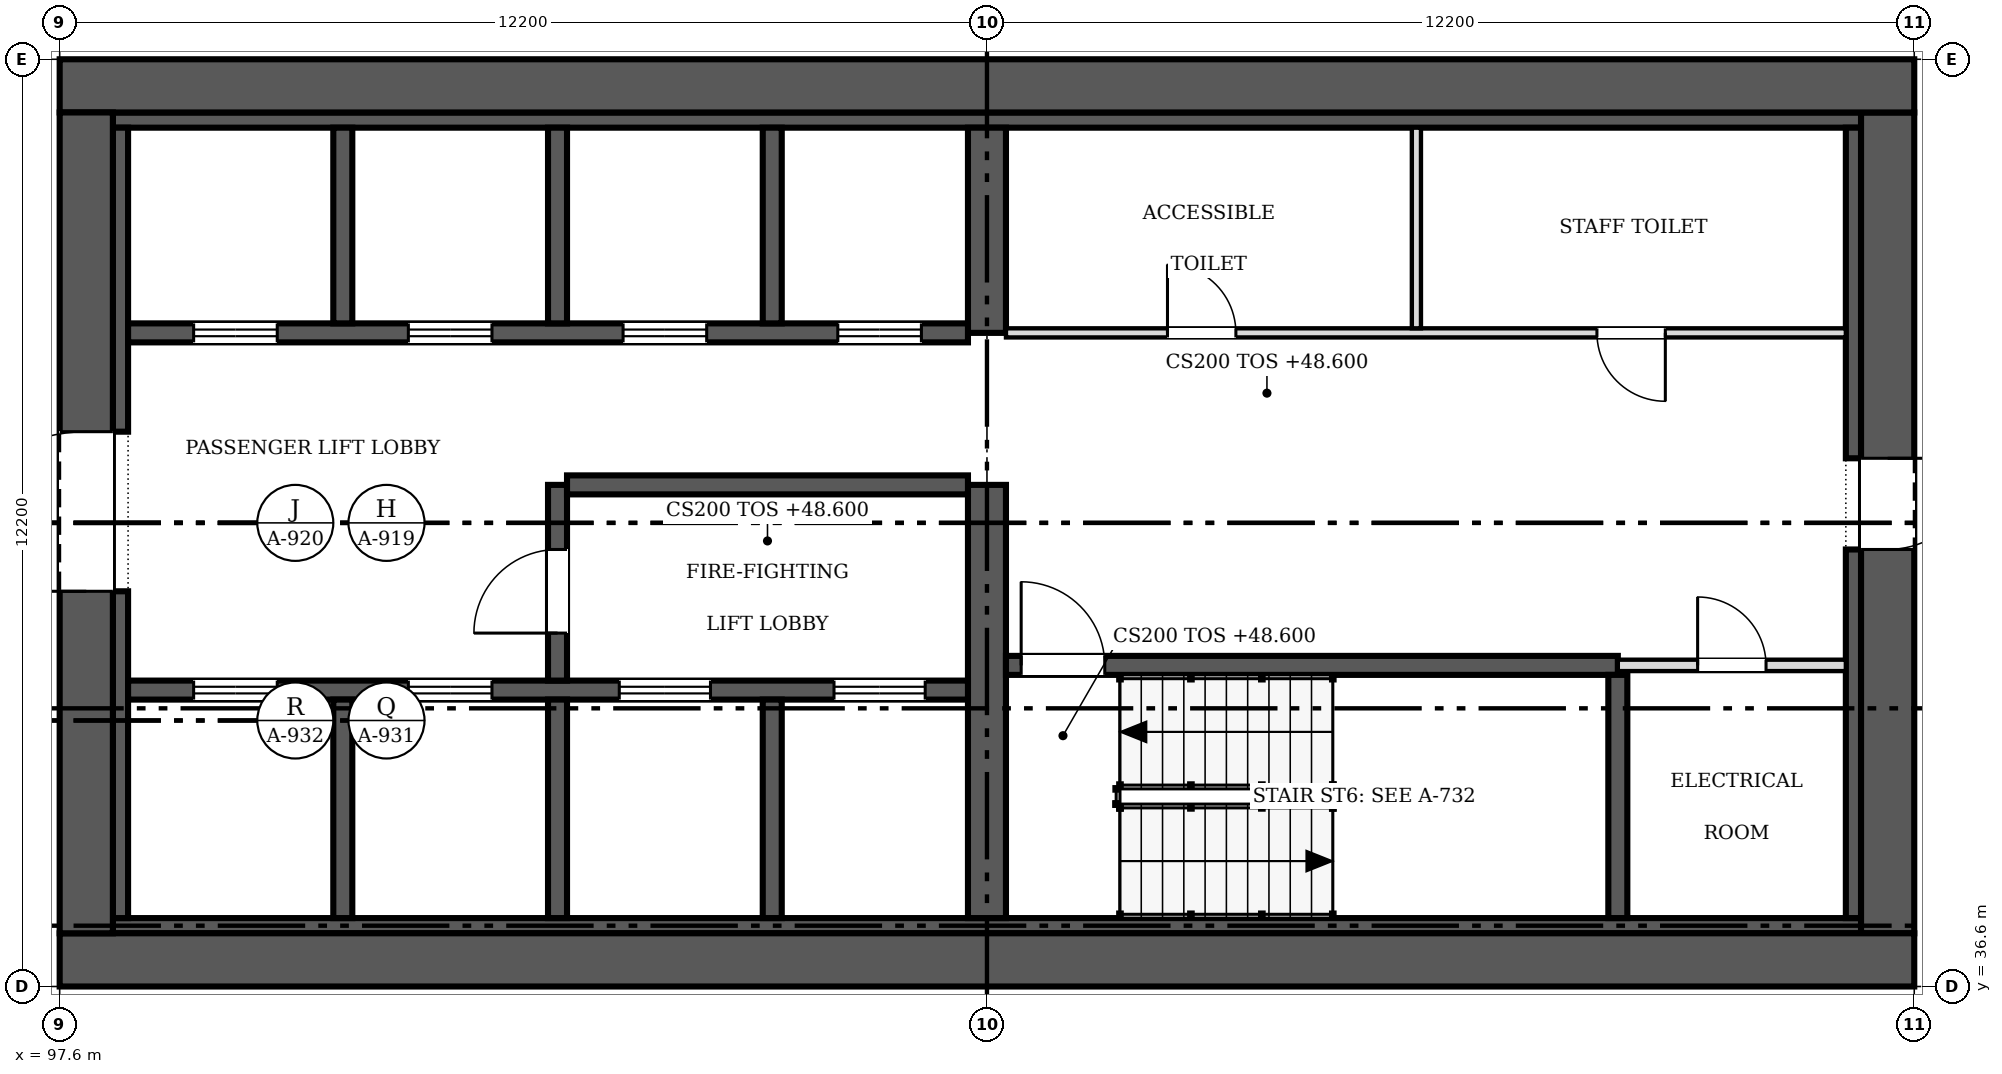
"""IFC4 building model, lengths in metres.
Left out: names, types, materials, properties, quantities, classifications, styles, units other than length and angle.
Written with IfcOpenShell. Run it as: python <this file> out.ifc"""

import sys

from ifc_helpers import new_model, si_unit, direction, frame, frame_2d, origin, place, context, subcontext, project, spatial, rectangle, extrude, source, transform, mapped, element, fill, save


model = new_model("IFC4")
c1 = context("Model", 3, precision=1e-05, world=origin(), true_north=direction((0.0, 1.0)))
c2 = subcontext(c1, "Body", "Model", "MODEL_VIEW")
j1 = project(units=[si_unit("LENGTHUNIT", "METRE"), si_unit("PLANEANGLEUNIT", "RADIAN")], contexts=[c1])
p1 = place(None, origin())
s1 = spatial("IfcSite", under=j1, at=p1, CompositionType="ELEMENT")
p2 = place(p1, origin())
s2 = spatial("IfcBuilding", under=s1, at=p2, CompositionType="ELEMENT")
p3 = place(p2, frame((0.0, 0.0, 48.6)))
s3 = spatial("IfcBuildingStorey", under=s2, at=p3, CompositionType="ELEMENT", Elevation=48.6)
p4 = place(p3, frame((122.0, 36.95, 0.0), z_axis=(0.0, 0.0, 1.0), x_axis=(-1.0, 0.0, 0.0)))
e1 = element("IfcWall", 1, at=p4, inside=s3, PredefinedType="SHEAR", context=c2, shape_type="SweptSolid", body=[
    extrude(rectangle(XDim=24.4, YDim=0.7, at=frame_2d((12.2, 0.0))), origin(), (0.0, 0.0, 1.0), 3.8),
])
p5 = place(p3, frame((97.95, 37.3, 0.0), z_axis=(0.0, 0.0, 1.0), x_axis=(0.0, 1.0, 0.0)))
e2 = element("IfcWall", 2, at=p5, inside=s3, PredefinedType="SHEAR", context=c2, shape_type="SweptSolid", body=[
    extrude(rectangle(XDim=10.8, YDim=0.7, at=frame_2d((5.4, 0.0))), origin(), (0.0, 0.0, 1.0), 3.8),
])
m1 = source(origin(), c2, "Body", "SweptSolid", [
    extrude(rectangle(XDim=2.1, YDim=2.4, at=frame_2d((1.05, 1.2))), frame((0.0, 0.36, 0.0), z_axis=(0.0, -1.0, 0.0), x_axis=(1.0, 0.0, 0.0)), (0.0, 0.0, 1.0), 0.72),
])
p6 = place(p5, frame((4.5, 0.0, 0.0)))
e3 = element("IfcOpeningElement", 3, at=p6, cuts=e2, PredefinedType="OPENING", context=c2, shape_type="MappedRepresentation", body=[
    mapped(m1, transform((0.0, 0.0, 0.0), scale=1.0)),
])
p7 = place(p3, frame((97.6, 48.45, 0.0), z_axis=(0.0, 0.0, 1.0), x_axis=(1.0, 0.0, 0.0)))
e4 = element("IfcWall", 4, at=p7, inside=s3, PredefinedType="SHEAR", context=c2, shape_type="SweptSolid", body=[
    extrude(rectangle(XDim=24.4, YDim=0.7, at=frame_2d((12.2, 0.0))), origin(), (0.0, 0.0, 1.0), 3.8),
])
p8 = place(p3, frame((121.65, 48.1, 0.0), z_axis=(0.0, 0.0, 1.0), x_axis=(0.0, -1.0, 0.0)))
e5 = element("IfcWall", 5, at=p8, inside=s3, PredefinedType="SHEAR", context=c2, shape_type="SweptSolid", body=[
    extrude(rectangle(XDim=10.8, YDim=0.7, at=frame_2d((5.4, 0.0))), origin(), (0.0, 0.0, 1.0), 3.8),
])
m2 = source(origin(), c2, "Body", "SweptSolid", [
    extrude(rectangle(XDim=1.2, YDim=2.1, at=frame_2d((0.6, 1.05))), frame((0.0, 0.36, 0.0), z_axis=(0.0, -1.0, 0.0), x_axis=(1.0, 0.0, 0.0)), (0.0, 0.0, 1.0), 0.72),
])
p9 = place(p8, frame((4.55, 0.0, 0.0)))
e6 = element("IfcOpeningElement", 6, at=p9, cuts=e5, PredefinedType="OPENING", context=c2, shape_type="MappedRepresentation", body=[
    mapped(m2, transform((0.0, 0.0, 0.0), scale=1.0)),
])
for number, where, z_axis, x_axis in (
    (7, (98.3, 37.4, 0.0), (0.0, 0.0, 1.0), (1.0, 0.0, 0.0)),
    (8, (98.3, 48.0, 0.0), (0.0, 0.0, 1.0), (1.0, 0.0, 0.0)),
):
    element("IfcWall", number, at=place(p3, frame(where, z_axis=z_axis, x_axis=x_axis)), inside=s3, PredefinedType="SOLIDWALL", context=c2, shape_type="SweptSolid", body=[
        extrude(rectangle(XDim=23.0, YDim=0.2, at=frame_2d((11.5, 0.0))), origin(), (0.0, 0.0, 1.0), 3.8),
    ])
p10 = place(p3, frame((98.4, 37.5, 0.0), z_axis=(0.0, 0.0, 1.0), x_axis=(0.0, 1.0, 0.0)))
e9 = element("IfcWall", 9, at=p10, inside=s3, PredefinedType="SOLIDWALL", context=c2, shape_type="SweptSolid", body=[
    extrude(rectangle(XDim=4.3, YDim=0.2, at=frame_2d((2.15, 0.0))), origin(), (0.0, 0.0, 1.0), 3.8),
])
p11 = place(p3, frame((98.4, 43.9, 0.0), z_axis=(0.0, 0.0, 1.0), x_axis=(0.0, 1.0, 0.0)))
e10 = element("IfcWall", 10, at=p11, inside=s3, PredefinedType="SOLIDWALL", context=c2, shape_type="SweptSolid", body=[
    extrude(rectangle(XDim=4.0, YDim=0.2, at=frame_2d((2.0, 0.0))), origin(), (0.0, 0.0, 1.0), 3.8),
])
p12 = place(p3, frame((121.2, 37.5, 0.0), z_axis=(0.0, 0.0, 1.0), x_axis=(0.0, 1.0, 0.0)))
e11 = element("IfcWall", 11, at=p12, inside=s3, PredefinedType="SOLIDWALL", context=c2, shape_type="SweptSolid", body=[
    extrude(rectangle(XDim=4.85, YDim=0.2, at=frame_2d((2.425, 0.0))), origin(), (0.0, 0.0, 1.0), 3.8),
])
p13 = place(p3, frame((121.2, 43.55, 0.0), z_axis=(0.0, 0.0, 1.0), x_axis=(0.0, 1.0, 0.0)))
e12 = element("IfcWall", 12, at=p13, inside=s3, PredefinedType="SOLIDWALL", context=c2, shape_type="SweptSolid", body=[
    extrude(rectangle(XDim=4.35, YDim=0.2, at=frame_2d((2.175, 0.0))), origin(), (0.0, 0.0, 1.0), 3.8),
])
p14 = place(p3, frame((109.8, 37.5, 0.0), z_axis=(0.0, 0.0, 1.0), x_axis=(0.0, 1.0, 0.0)))
e13 = element("IfcWall", 13, at=p14, inside=s3, PredefinedType="SHEAR", context=c2, shape_type="SweptSolid", body=[
    extrude(rectangle(XDim=5.7, YDim=0.5, at=frame_2d((2.85, 0.0))), origin(), (0.0, 0.0, 1.0), 3.8),
])
p15 = place(p3, frame((109.8, 45.2, 0.0), z_axis=(0.0, 0.0, 1.0), x_axis=(0.0, 1.0, 0.0)))
e14 = element("IfcWall", 14, at=p15, inside=s3, PredefinedType="SHEAR", context=c2, shape_type="SweptSolid", body=[
    extrude(rectangle(XDim=2.7, YDim=0.5, at=frame_2d((1.35, 0.0))), origin(), (0.0, 0.0, 1.0), 3.8),
])
p16 = place(p3, frame((98.5, 40.5, 0.0), z_axis=(0.0, 0.0, 1.0), x_axis=(1.0, 0.0, 0.0)))
e15 = element("IfcWall", 15, at=p16, inside=s3, PredefinedType="SOLIDWALL", context=c2, shape_type="SweptSolid", body=[
    extrude(rectangle(XDim=11.05, YDim=0.25, at=frame_2d((5.525, 0.0))), origin(), (0.0, 0.0, 1.0), 3.8),
])
m3 = source(origin(), c2, "Body", "SweptSolid", [
    extrude(rectangle(XDim=1.1, YDim=2.1, at=frame_2d((0.55, 1.05))), frame((0.0, 0.135, 0.0), z_axis=(0.0, -1.0, 0.0), x_axis=(1.0, 0.0, 0.0)), (0.0, 0.0, 1.0), 0.27),
])
p17 = place(p16, frame((0.863, 0.0, 0.0)))
e16 = element("IfcOpeningElement", 16, at=p17, cuts=e15, PredefinedType="OPENING", context=c2, shape_type="MappedRepresentation", body=[
    mapped(m3, transform((0.0, 0.0, 0.0), scale=1.0)),
])
p18 = place(p16, frame((3.688, 0.0, 0.0)))
e17 = element("IfcOpeningElement", 17, at=p18, cuts=e15, PredefinedType="OPENING", context=c2, shape_type="MappedRepresentation", body=[
    mapped(m3, transform((0.0, 0.0, 0.0), scale=1.0)),
])
m4 = source(origin(), c2, "Body", "SweptSolid", [
    extrude(rectangle(XDim=1.2, YDim=2.1, at=frame_2d((0.6, 1.05))), frame((0.0, 0.135, 0.0), z_axis=(0.0, -1.0, 0.0), x_axis=(1.0, 0.0, 0.0)), (0.0, 0.0, 1.0), 0.27),
])
p19 = place(p16, frame((6.462, 0.0, 0.0)))
e18 = element("IfcOpeningElement", 18, at=p19, cuts=e15, PredefinedType="OPENING", context=c2, shape_type="MappedRepresentation", body=[
    mapped(m4, transform((0.0, 0.0, 0.0), scale=1.0)),
])
p20 = place(p16, frame((9.288, 0.0, 0.0)))
e19 = element("IfcOpeningElement", 19, at=p20, cuts=e15, PredefinedType="OPENING", context=c2, shape_type="MappedRepresentation", body=[
    mapped(m4, transform((0.0, 0.0, 0.0), scale=1.0)),
])
p21 = place(p3, frame((109.55, 45.2, 0.0), z_axis=(0.0, 0.0, 1.0), x_axis=(-1.0, 0.0, 0.0)))
e20 = element("IfcWall", 20, at=p21, inside=s3, PredefinedType="SOLIDWALL", context=c2, shape_type="SweptSolid", body=[
    extrude(rectangle(XDim=11.05, YDim=0.25, at=frame_2d((5.525, 0.0))), origin(), (0.0, 0.0, 1.0), 3.8),
])
p22 = place(p21, frame((9.087, 0.0, 0.0)))
e21 = element("IfcOpeningElement", 21, at=p22, cuts=e20, PredefinedType="OPENING", context=c2, shape_type="MappedRepresentation", body=[
    mapped(m3, transform((0.0, 0.0, 0.0), scale=1.0)),
])
p23 = place(p21, frame((6.262, 0.0, 0.0)))
e22 = element("IfcOpeningElement", 22, at=p23, cuts=e20, PredefinedType="OPENING", context=c2, shape_type="MappedRepresentation", body=[
    mapped(m3, transform((0.0, 0.0, 0.0), scale=1.0)),
])
p24 = place(p21, frame((3.438, 0.0, 0.0)))
e23 = element("IfcOpeningElement", 23, at=p24, cuts=e20, PredefinedType="OPENING", context=c2, shape_type="MappedRepresentation", body=[
    mapped(m3, transform((0.0, 0.0, 0.0), scale=1.0)),
])
p25 = place(p21, frame((0.613, 0.0, 0.0)))
e24 = element("IfcOpeningElement", 24, at=p25, cuts=e20, PredefinedType="OPENING", context=c2, shape_type="MappedRepresentation", body=[
    mapped(m3, transform((0.0, 0.0, 0.0), scale=1.0)),
])
p26 = place(p3, frame((118.1, 40.825, 0.0), z_axis=(0.0, 0.0, 1.0), x_axis=(-1.0, 0.0, 0.0)))
e25 = element("IfcWall", 25, at=p26, inside=s3, PredefinedType="SOLIDWALL", context=c2, shape_type="SweptSolid", body=[
    extrude(rectangle(XDim=8.05, YDim=0.25, at=frame_2d((4.025, 0.0))), origin(), (0.0, 0.0, 1.0), 3.8),
])
p27 = place(p26, frame((6.75, 0.0, 0.0)))
e26 = element("IfcOpeningElement", 26, at=p27, cuts=e25, PredefinedType="OPENING", context=c2, shape_type="MappedRepresentation", body=[
    mapped(m3, transform((0.0, 0.0, 0.0), scale=1.0)),
])
p28 = place(p3, frame((104.15, 37.5, 0.0), z_axis=(0.0, 0.0, 1.0), x_axis=(0.0, 1.0, 0.0)))
e27 = element("IfcWall", 27, at=p28, inside=s3, PredefinedType="SOLIDWALL", context=c2, shape_type="SweptSolid", body=[
    extrude(rectangle(XDim=2.875, YDim=0.25, at=frame_2d((1.438, 0.0))), origin(), (0.0, 0.0, 1.0), 3.8),
])
p29 = place(p3, frame((104.15, 43.2, 0.0), z_axis=(0.0, 0.0, 1.0), x_axis=(0.0, -1.0, 0.0)))
e28 = element("IfcWall", 28, at=p29, inside=s3, PredefinedType="SOLIDWALL", context=c2, shape_type="SweptSolid", body=[
    extrude(rectangle(XDim=2.575, YDim=0.25, at=frame_2d((1.288, 0.0))), origin(), (0.0, 0.0, 1.0), 3.8),
])
p30 = place(p29, frame((0.85, 0.0, 0.0)))
e29 = element("IfcOpeningElement", 29, at=p30, cuts=e28, PredefinedType="OPENING", context=c2, shape_type="MappedRepresentation", body=[
    mapped(m3, transform((0.0, 0.0, 0.0), scale=1.0)),
])
p31 = place(p3, frame((104.275, 43.2, 0.0), z_axis=(0.0, 0.0, 1.0), x_axis=(1.0, 0.0, 0.0)))
e30 = element("IfcWall", 30, at=p31, inside=s3, PredefinedType="SOLIDWALL", context=c2, shape_type="SweptSolid", body=[
    extrude(rectangle(XDim=5.275, YDim=0.25, at=frame_2d((2.638, 0.0))), origin(), (0.0, 0.0, 1.0), 3.8),
])
p32 = place(p3, frame((118.1, 37.5, 0.0), z_axis=(0.0, 0.0, 1.0), x_axis=(0.0, 1.0, 0.0)))
e31 = element("IfcWall", 31, at=p32, inside=s3, PredefinedType="SOLIDWALL", context=c2, shape_type="SweptSolid", body=[
    extrude(rectangle(XDim=3.2, YDim=0.25, at=frame_2d((1.6, 0.0))), origin(), (0.0, 0.0, 1.0), 3.8),
])
for number, where, z_axis, x_axis in (
    (32, (101.325, 37.5, 0.0), (0.0, 0.0, 1.0), (0.0, 1.0, 0.0)),
    (33, (106.975, 37.5, 0.0), (0.0, 0.0, 1.0), (0.0, 1.0, 0.0)),
):
    element("IfcWall", number, at=place(p3, frame(where, z_axis=z_axis, x_axis=x_axis)), inside=s3, PredefinedType="SOLIDWALL", context=c2, shape_type="SweptSolid", body=[
        extrude(rectangle(XDim=2.875, YDim=0.25, at=frame_2d((1.438, 0.0))), origin(), (0.0, 0.0, 1.0), 3.8),
    ])
for number, where, z_axis, x_axis in (
    (34, (101.325, 45.325, 0.0), (0.0, 0.0, 1.0), (0.0, 1.0, 0.0)),
    (35, (104.15, 45.325, 0.0), (0.0, 0.0, 1.0), (0.0, 1.0, 0.0)),
    (36, (106.975, 45.325, 0.0), (0.0, 0.0, 1.0), (0.0, 1.0, 0.0)),
):
    element("IfcWall", number, at=place(p3, frame(where, z_axis=z_axis, x_axis=x_axis)), inside=s3, PredefinedType="SOLIDWALL", context=c2, shape_type="SweptSolid", body=[
        extrude(rectangle(XDim=2.575, YDim=0.25, at=frame_2d((1.288, 0.0))), origin(), (0.0, 0.0, 1.0), 3.8),
    ])
p33 = place(p3, frame((110.05, 45.2, 0.0), z_axis=(0.0, 0.0, 1.0), x_axis=(1.0, 0.0, 0.0)))
e37 = element("IfcWall", 37, at=p33, inside=s3, PredefinedType="PARTITIONING", context=c2, shape_type="SweptSolid", body=[
    extrude(rectangle(XDim=11.05, YDim=0.12, at=frame_2d((5.525, 0.0))), origin(), (0.0, 0.0, 1.0), 3.6),
])
m5 = source(origin(), c2, "Body", "SweptSolid", [
    extrude(rectangle(XDim=0.9, YDim=2.1, at=frame_2d((0.45, 1.05))), frame((0.0, 0.07, 0.0), z_axis=(0.0, -1.0, 0.0), x_axis=(1.0, 0.0, 0.0)), (0.0, 0.0, 1.0), 0.14),
])
p34 = place(p33, frame((2.125, 0.0, 0.0)))
e38 = element("IfcOpeningElement", 38, at=p34, cuts=e37, PredefinedType="OPENING", context=c2, shape_type="MappedRepresentation", body=[
    mapped(m5, transform((0.0, 0.0, 0.0), scale=1.0)),
])
p35 = place(p33, frame((7.775, 0.0, 0.0)))
e39 = element("IfcOpeningElement", 39, at=p35, cuts=e37, PredefinedType="OPENING", context=c2, shape_type="MappedRepresentation", body=[
    mapped(m5, transform((0.0, 0.0, 0.0), scale=1.0)),
])
p36 = place(p3, frame((121.1, 40.825, 0.0), z_axis=(0.0, 0.0, 1.0), x_axis=(-1.0, 0.0, 0.0)))
e40 = element("IfcWall", 40, at=p36, inside=s3, PredefinedType="PARTITIONING", context=c2, shape_type="SweptSolid", body=[
    extrude(rectangle(XDim=3.0, YDim=0.15, at=frame_2d((1.5, 0.0))), origin(), (0.0, 0.0, 1.0), 3.6),
])
m6 = source(origin(), c2, "Body", "SweptSolid", [
    extrude(rectangle(XDim=0.9, YDim=2.1, at=frame_2d((0.45, 1.05))), frame((0.0, 0.085, 0.0), z_axis=(0.0, -1.0, 0.0), x_axis=(1.0, 0.0, 0.0)), (0.0, 0.0, 1.0), 0.17),
])
p37 = place(p36, frame((1.05, 0.0, 0.0)))
e41 = element("IfcOpeningElement", 41, at=p37, cuts=e40, PredefinedType="OPENING", context=c2, shape_type="MappedRepresentation", body=[
    mapped(m6, transform((0.0, 0.0, 0.0), scale=1.0)),
])
p38 = place(p3, frame((115.45, 45.26, 0.0), z_axis=(0.0, 0.0, 1.0), x_axis=(0.0, 1.0, 0.0)))
e42 = element("IfcWall", 42, at=p38, inside=s3, PredefinedType="PARTITIONING", context=c2, shape_type="SweptSolid", body=[
    extrude(rectangle(XDim=2.64, YDim=0.12, at=frame_2d((1.32, 0.0))), origin(), (0.0, 0.0, 1.0), 3.6),
])
m7 = source(origin(), c2, "Body", "SweptSolid", [
    extrude(rectangle(XDim=2.1, YDim=2.4, at=frame_2d((1.05, 1.2))), frame((0.0, 0.025, 0.0), z_axis=(0.0, -1.0, 0.0), x_axis=(1.0, 0.0, 0.0)), (0.0, 0.0, 1.0), 0.05),
])
p39 = place(p6, origin())
e43 = element("IfcDoor", 43, at=p39, inside=s3, OperationType="DOUBLE_DOOR_SINGLE_SWING", PredefinedType="DOOR", context=c2, shape_type="MappedRepresentation", body=[
    mapped(m7, transform((0.0, 0.0, 0.0), scale=1.0)),
])
fill(e3, e43)
m8 = source(origin(), c2, "Body", "SweptSolid", [
    extrude(rectangle(XDim=1.2, YDim=2.1, at=frame_2d((0.6, 1.05))), frame((0.0, 0.025, 0.0), z_axis=(0.0, -1.0, 0.0), x_axis=(1.0, 0.0, 0.0)), (0.0, 0.0, 1.0), 0.05),
])
p40 = place(p9, origin())
e44 = element("IfcDoor", 44, at=p40, inside=s3, OperationType="SINGLE_SWING_LEFT", PredefinedType="DOOR", context=c2, shape_type="MappedRepresentation", body=[
    mapped(m8, transform((0.0, 0.0, 0.0), scale=1.0)),
])
fill(e6, e44)
m9 = source(origin(), c2, "Body", "SweptSolid", [
    extrude(rectangle(XDim=1.1, YDim=2.1, at=frame_2d((0.55, 1.05))), frame((0.0, 0.025, 0.0), z_axis=(0.0, -1.0, 0.0), x_axis=(1.0, 0.0, 0.0)), (0.0, 0.0, 1.0), 0.05),
])
p41 = place(p17, origin())
e45 = element("IfcDoor", 45, at=p41, inside=s3, OperationType="DOUBLE_DOOR_SLIDING", PredefinedType="DOOR", context=c2, shape_type="MappedRepresentation", body=[
    mapped(m9, transform((0.0, 0.0, 0.0), scale=1.0)),
])
fill(e16, e45)
p42 = place(p18, origin())
e46 = element("IfcDoor", 46, at=p42, inside=s3, OperationType="DOUBLE_DOOR_SLIDING", PredefinedType="DOOR", context=c2, shape_type="MappedRepresentation", body=[
    mapped(m9, transform((0.0, 0.0, 0.0), scale=1.0)),
])
fill(e17, e46)
p43 = place(p19, origin())
e47 = element("IfcDoor", 47, at=p43, inside=s3, OperationType="DOUBLE_DOOR_SLIDING", PredefinedType="DOOR", context=c2, shape_type="MappedRepresentation", body=[
    mapped(m8, transform((0.0, 0.0, 0.0), scale=1.0)),
])
fill(e18, e47)
p44 = place(p20, origin())
e48 = element("IfcDoor", 48, at=p44, inside=s3, OperationType="DOUBLE_DOOR_SLIDING", PredefinedType="DOOR", context=c2, shape_type="MappedRepresentation", body=[
    mapped(m8, transform((0.0, 0.0, 0.0), scale=1.0)),
])
fill(e19, e48)
p45 = place(p22, origin())
e49 = element("IfcDoor", 49, at=p45, inside=s3, OperationType="DOUBLE_DOOR_SLIDING", PredefinedType="DOOR", context=c2, shape_type="MappedRepresentation", body=[
    mapped(m9, transform((0.0, 0.0, 0.0), scale=1.0)),
])
fill(e21, e49)
p46 = place(p23, origin())
e50 = element("IfcDoor", 50, at=p46, inside=s3, OperationType="DOUBLE_DOOR_SLIDING", PredefinedType="DOOR", context=c2, shape_type="MappedRepresentation", body=[
    mapped(m9, transform((0.0, 0.0, 0.0), scale=1.0)),
])
fill(e22, e50)
p47 = place(p24, origin())
e51 = element("IfcDoor", 51, at=p47, inside=s3, OperationType="DOUBLE_DOOR_SLIDING", PredefinedType="DOOR", context=c2, shape_type="MappedRepresentation", body=[
    mapped(m9, transform((0.0, 0.0, 0.0), scale=1.0)),
])
fill(e23, e51)
p48 = place(p25, origin())
e52 = element("IfcDoor", 52, at=p48, inside=s3, OperationType="DOUBLE_DOOR_SLIDING", PredefinedType="DOOR", context=c2, shape_type="MappedRepresentation", body=[
    mapped(m9, transform((0.0, 0.0, 0.0), scale=1.0)),
])
fill(e24, e52)
p49 = place(p27, origin())
e53 = element("IfcDoor", 53, at=p49, inside=s3, OperationType="SINGLE_SWING_RIGHT", PredefinedType="DOOR", context=c2, shape_type="MappedRepresentation", body=[
    mapped(m9, transform((0.0, 0.0, 0.0), scale=1.0)),
])
fill(e26, e53)
p50 = place(p30, origin())
e54 = element("IfcDoor", 54, at=p50, inside=s3, OperationType="SINGLE_SWING_RIGHT", PredefinedType="DOOR", context=c2, shape_type="MappedRepresentation", body=[
    mapped(m9, transform((0.0, 0.0, 0.0), scale=1.0)),
])
fill(e29, e54)
m10 = source(origin(), c2, "Body", "SweptSolid", [
    extrude(rectangle(XDim=0.9, YDim=2.1, at=frame_2d((0.45, 1.05))), frame((0.0, 0.025, 0.0), z_axis=(0.0, -1.0, 0.0), x_axis=(1.0, 0.0, 0.0)), (0.0, 0.0, 1.0), 0.05),
])
p51 = place(p34, origin())
e55 = element("IfcDoor", 55, at=p51, inside=s3, OperationType="SINGLE_SWING_LEFT", PredefinedType="DOOR", context=c2, shape_type="MappedRepresentation", body=[
    mapped(m10, transform((0.0, 0.0, 0.0), scale=1.0)),
])
fill(e38, e55)
p52 = place(p35, origin())
e56 = element("IfcDoor", 56, at=p52, inside=s3, OperationType="SINGLE_SWING_RIGHT", PredefinedType="DOOR", context=c2, shape_type="MappedRepresentation", body=[
    mapped(m10, transform((0.0, 0.0, 0.0), scale=1.0)),
])
fill(e39, e56)
p53 = place(p37, origin())
e57 = element("IfcDoor", 57, at=p53, inside=s3, OperationType="SINGLE_SWING_RIGHT", PredefinedType="DOOR", context=c2, shape_type="MappedRepresentation", body=[
    mapped(m10, transform((0.0, 0.0, 0.0), scale=1.0)),
])
fill(e41, e57)
save(model, sys.argv[1])
